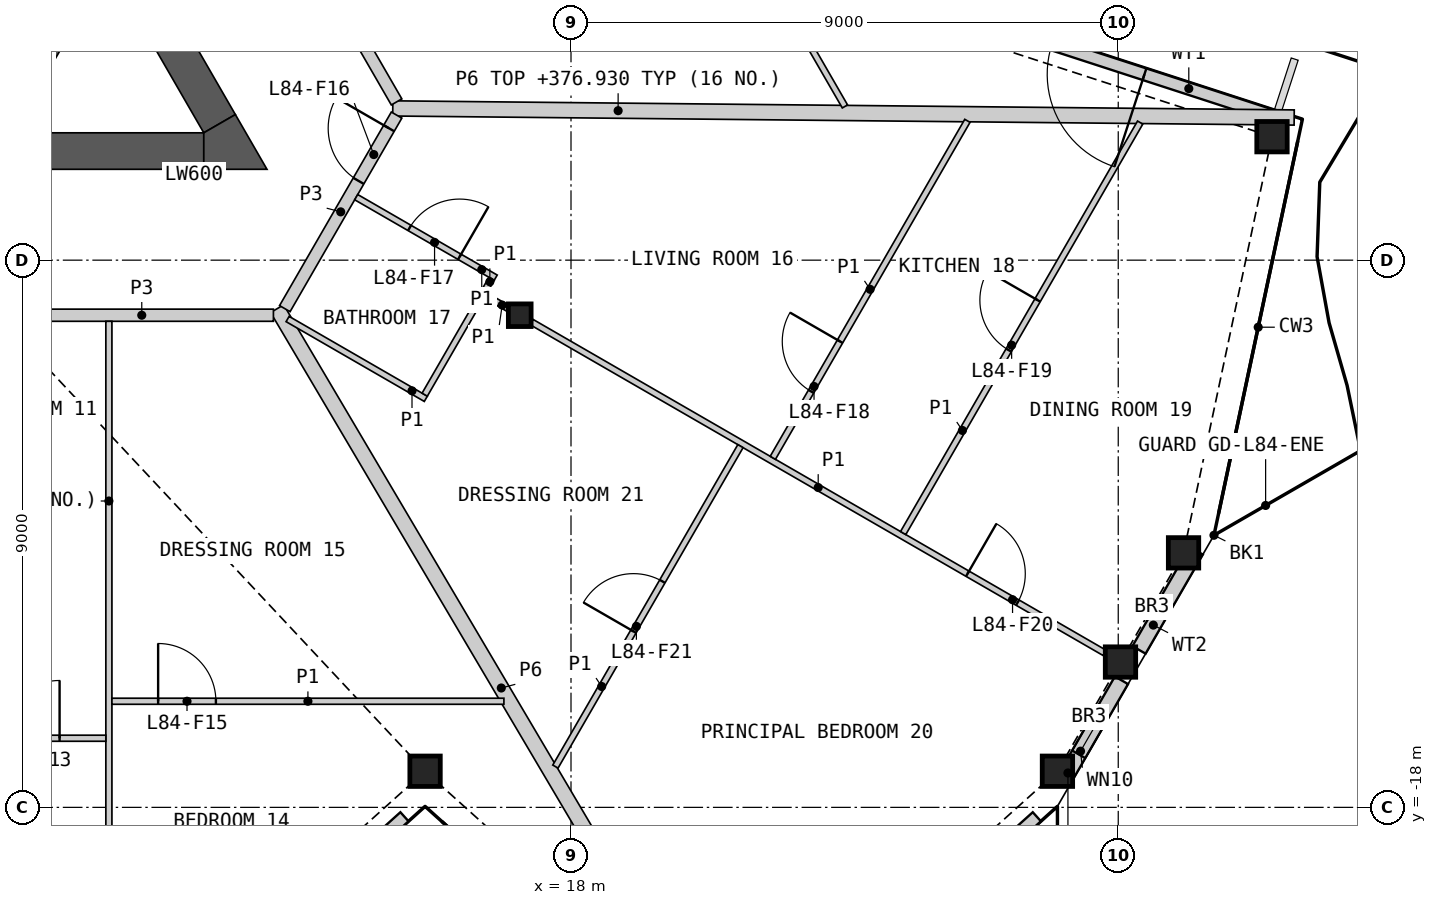
"""IFC4 building model, lengths in metres.
Left out: names, types, materials, properties, quantities, classifications, styles, units other than length and angle.
Written with IfcOpenShell. Run it as: python <this file> out.ifc"""

import sys

from ifc_helpers import new_model, si_unit, direction, frame, frame_2d, origin, origin_2d, place, context, subcontext, project, spatial, polyline, rectangle, hollow_rectangle, i_section, outline, extrude, element, fill, save


model = new_model("IFC4")
c1 = context("Model", 3, precision=1e-05, world=origin(), true_north=direction((0.0, 1.0)))
c2 = subcontext(c1, "Body", "Model", "MODEL_VIEW")
j1 = project(units=[si_unit("LENGTHUNIT", "METRE"), si_unit("PLANEANGLEUNIT", "RADIAN")], contexts=[c1])
p1 = place(None, origin())
s1 = spatial("IfcSite", under=j1, at=p1, CompositionType="ELEMENT")
p2 = place(p1, origin())
s2 = spatial("IfcBuilding", under=s1, at=p2, CompositionType="ELEMENT")
p3 = place(p2, frame((0.0, 0.0, 374.6)))
s3 = spatial("IfcBuildingStorey", under=s2, at=p3, CompositionType="ELEMENT", Elevation=374.6)
for number, where, z_axis, x_axis in (
    (1, (15.6, -17.406, 0.0), (0.0, 0.0, 1.0), (1.0, 0.0, 0.0)),
    (2, (26.0, -17.406, 0.0), (0.0, 0.0, 1.0), (1.0, 0.0, 0.0)),
    (3, (27.037, -15.61, 0.0), (0.0, 0.0, 1.0), (1.0, 0.0, 0.0)),
    (4, (28.074, -13.814, 0.0), (0.0, 0.0, 1.0), (1.0, 0.0, 0.0)),
    (5, (29.529, -6.969, 0.0), (0.0, 0.0, 1.0), (1.0, 0.0, 0.0)),
):
    element("IfcColumn", number, at=place(p3, frame(where, z_axis=z_axis, x_axis=x_axis)), inside=s3, PredefinedType="COLUMN", context=c2, shape_type="SweptSolid", body=[
        extrude(hollow_rectangle(XDim=0.5, YDim=0.5, WallThickness=0.03, at=origin_2d()), origin(), (0.0, 0.0, 1.0), 3.4),
    ])
p4 = place(p3, frame((17.157, -9.906, 0.0), z_axis=(0.0, 0.0, 1.0), x_axis=(1.0, 0.0, 0.0)))
e6 = element("IfcColumn", 6, at=p4, inside=s3, PredefinedType="COLUMN", context=c2, shape_type="SweptSolid", body=[
    extrude(i_section(OverallWidth=0.374, OverallDepth=0.372, WebThickness=0.016, FlangeThickness=0.026, at=origin_2d()), origin(), (0.0, 0.0, 1.0), 3.4),
])
p5 = place(p3, frame((10.605, -22.346, 0.0), z_axis=(0.0, 0.0, 1.0), x_axis=(0.743137181878, 0.669139095339, 0.0)))
e7 = element("IfcWall", 7, at=p5, inside=s3, PredefinedType="SOLIDWALL", context=c2, shape_type="SweptSolid", body=[
    extrude(rectangle(XDim=6.265, YDim=0.2, at=frame_2d((3.133, 0.0))), origin(), (0.0, 0.0, 1.0), 2.634),
])
p6 = place(p5, frame((2.333, 0.0, 0.0)))
e8 = element("IfcOpeningElement", 8, at=p6, cuts=e7, PredefinedType="OPENING", context=c2, shape_type="SweptSolid", body=[
    extrude(rectangle(XDim=1.6, YDim=2.25, at=frame_2d((0.8, 1.125))), frame((0.0, 0.11, 0.0), z_axis=(0.0, -1.0, 0.0), x_axis=(1.0, 0.0, 0.0)), (0.0, 0.0, 1.0), 0.22),
])
p7 = place(p3, frame((21.005, -22.346, 0.0), z_axis=(0.0, 0.0, 1.0), x_axis=(0.743137181878, 0.669139095339, 0.0)))
e9 = element("IfcWall", 9, at=p7, inside=s3, PredefinedType="SOLIDWALL", context=c2, shape_type="SweptSolid", body=[
    extrude(rectangle(XDim=6.265, YDim=0.2, at=frame_2d((3.133, 0.0))), origin(), (0.0, 0.0, 1.0), 2.634),
])
p8 = place(p7, frame((2.333, 0.0, 0.0)))
e10 = element("IfcOpeningElement", 10, at=p8, cuts=e9, PredefinedType="OPENING", context=c2, shape_type="SweptSolid", body=[
    extrude(rectangle(XDim=1.6, YDim=2.25, at=frame_2d((0.8, 1.125))), frame((0.0, 0.11, 0.0), z_axis=(0.0, -1.0, 0.0), x_axis=(1.0, 0.0, 0.0)), (0.0, 0.0, 1.0), 0.22),
])
p9 = place(p3, frame((26.075, -17.604, 0.0), z_axis=(0.0, 0.0, 1.0), x_axis=(0.500017700655, 0.866015184065, 0.0)))
e11 = element("IfcWall", 11, at=p9, inside=s3, PredefinedType="SOLIDWALL", context=c2, shape_type="SweptSolid", body=[
    extrude(rectangle(XDim=1.957, YDim=0.25, at=frame_2d((0.978, 0.0))), origin(), (0.0, 0.0, 1.0), 2.634),
])
p10 = place(p9, frame((0.55, 0.0, 0.4)))
e12 = element("IfcOpeningElement", 12, at=p10, cuts=e11, PredefinedType="OPENING", context=c2, shape_type="SweptSolid", body=[
    extrude(rectangle(XDim=0.6, YDim=0.6, at=frame_2d((0.3, 0.3))), frame((0.0, 0.135, 0.0), z_axis=(0.0, -1.0, 0.0), x_axis=(1.0, 0.0, 0.0)), (0.0, 0.0, 1.0), 0.27),
])
p11 = place(p3, frame((27.342, -15.41, 0.0), z_axis=(0.0, 0.0, 1.0), x_axis=(0.500044242988, 0.865999858577, 0.0)))
e13 = element("IfcWall", 13, at=p11, inside=s3, PredefinedType="SOLIDWALL", context=c2, shape_type="SweptSolid", body=[
    extrude(rectangle(XDim=1.883, YDim=0.25, at=frame_2d((0.941, 0.0))), origin(), (0.0, 0.0, 1.0), 2.634),
])
p12 = place(p3, frame((29.65, -6.663, 0.0), z_axis=(0.0, 0.0, 1.0), x_axis=(-0.951056402988, 0.3090173431, 0.0)))
e14 = element("IfcWall", 14, at=p12, inside=s3, PredefinedType="SOLIDWALL", context=c2, shape_type="SweptSolid", body=[
    extrude(rectangle(XDim=6.265, YDim=0.2, at=frame_2d((3.133, 0.0))), origin(), (0.0, 0.0, 1.0), 2.634),
])
p13 = place(p12, frame((2.333, 0.0, 0.0)))
e15 = element("IfcOpeningElement", 15, at=p13, cuts=e14, PredefinedType="OPENING", context=c2, shape_type="SweptSolid", body=[
    extrude(rectangle(XDim=1.6, YDim=2.25, at=frame_2d((0.8, 1.125))), frame((0.0, 0.11, 0.0), z_axis=(0.0, -1.0, 0.0), x_axis=(1.0, 0.0, 0.0)), (0.0, 0.0, 1.0), 0.22),
])
p14 = place(p3, origin())
e16 = element("IfcWall", 16, at=p14, inside=s3, PredefinedType="SHEAR", context=c2, shape_type="SweptSolid", body=[
    extrude(outline(polyline([(8.83, -6.881), (10.374, -4.206), (10.032, -4.298), (8.738, -6.539), (8.83, -6.881)])), origin(), (0.0, 0.0, 1.0), 3.1),
])
p15 = place(p3, frame((-4.892, -7.206, 0.0), z_axis=(0.0, 0.0, 1.0), x_axis=(1.0, 0.0, 0.0)))
e17 = element("IfcWall", 17, at=p15, inside=s3, PredefinedType="SHEAR", context=c2, shape_type="SweptSolid", body=[
    extrude(rectangle(XDim=16.853, YDim=0.6, at=frame_2d((8.426, 0.0))), origin(), (0.0, 0.0, 1.0), 3.1),
])
p16 = place(p3, frame((12.221, -6.756, 0.0), z_axis=(0.0, 0.0, 1.0), x_axis=(-0.50000604952, 0.866021911064, 0.0)))
e18 = element("IfcWall", 18, at=p16, inside=s3, PredefinedType="SHEAR", context=c2, shape_type="SweptSolid", body=[
    extrude(rectangle(XDim=4.869, YDim=0.6, at=frame_2d((2.434, 0.0))), origin(), (0.0, 0.0, 1.0), 3.1),
])
p17 = place(p3, origin())
e19 = element("IfcWall", 19, at=p17, inside=s3, PredefinedType="SHEAR", context=c2, shape_type="SweptSolid", body=[
    extrude(outline(polyline([(11.961, -7.506), (11.961, -6.906), (12.48, -6.606), (13.0, -7.506), (11.961, -7.506)])), origin(), (0.0, 0.0, 1.0), 3.1),
])
p18 = place(p3, frame((15.069, -6.504, 0.0), z_axis=(0.0, 0.0, 1.0), x_axis=(0.999949045807, -0.01009483976, 0.0)))
e20 = element("IfcWall", 20, at=p18, inside=s3, PredefinedType="PARTITIONING", context=c2, shape_type="SweptSolid", body=[
    extrude(rectangle(XDim=14.825, YDim=0.25, at=frame_2d((7.413, 0.0))), origin(), (0.0, 0.0, 1.0), 2.33),
])
p19 = place(p3, frame((13.167, -9.798, 0.0), z_axis=(0.0, 0.0, 1.0), x_axis=(0.508707178493, -0.860939606796, 0.0)))
e21 = element("IfcWall", 21, at=p19, inside=s3, PredefinedType="PARTITIONING", context=c2, shape_type="SweptSolid", body=[
    extrude(rectangle(XDim=14.493, YDim=0.25, at=frame_2d((7.247, 0.0))), origin(), (0.0, 0.0, 1.0), 2.33),
])
p20 = place(p3, frame((8.775, -9.906, 0.0), z_axis=(0.0, 0.0, 1.0), x_axis=(1.0, 0.0, 0.0)))
e22 = element("IfcWall", 22, at=p20, inside=s3, PredefinedType="PARTITIONING", context=c2, shape_type="SweptSolid", body=[
    extrude(rectangle(XDim=4.331, YDim=0.2, at=frame_2d((2.165, 0.0))), origin(), (0.0, 0.0, 1.0), 3.1),
])
p21 = place(p3, frame((12.981, -2.673, 0.0), z_axis=(0.0, 0.0, 1.0), x_axis=(0.499986217557, -0.866033360935, 0.0)))
e23 = element("IfcWall", 23, at=p21, inside=s3, PredefinedType="PARTITIONING", context=c2, shape_type="SweptSolid", body=[
    extrude(rectangle(XDim=4.3, YDim=0.2, at=frame_2d((2.15, 0.0))), origin(), (0.0, 0.0, 1.0), 3.1),
])
p22 = place(p3, frame((13.293, -9.797, 0.0), z_axis=(0.0, 0.0, 1.0), x_axis=(0.499967746641, 0.866044024469, 0.0)))
e24 = element("IfcWall", 24, at=p22, inside=s3, PredefinedType="PARTITIONING", context=c2, shape_type="SweptSolid", body=[
    extrude(rectangle(XDim=3.676, YDim=0.2, at=frame_2d((1.838, 0.0))), origin(), (0.0, 0.0, 1.0), 3.1),
])
p23 = place(p22, frame((2.426, 0.0, 0.0)))
e25 = element("IfcOpeningElement", 25, at=p23, cuts=e24, PredefinedType="OPENING", context=c2, shape_type="SweptSolid", body=[
    extrude(rectangle(XDim=1.0, YDim=2.1, at=frame_2d((0.5, 1.05))), frame((0.0, 0.11, 0.0), z_axis=(0.0, -1.0, 0.0), x_axis=(1.0, 0.0, 0.0)), (0.0, 0.0, 1.0), 0.22),
])
p24 = place(p3, frame((10.4, -21.828, 0.0), z_axis=(0.0, 0.0, 1.0), x_axis=(0.0, 1.0, 0.0)))
e26 = element("IfcWall", 26, at=p24, inside=s3, PredefinedType="PARTITIONING", context=c2, shape_type="SweptSolid", body=[
    extrude(rectangle(XDim=11.822, YDim=0.1, at=frame_2d((5.911, 0.0))), origin(), (0.0, 0.0, 1.0), 2.33),
])
p25 = place(p24, frame((1.156, 0.0, 0.0)))
e27 = element("IfcOpeningElement", 27, at=p25, cuts=e26, PredefinedType="OPENING", context=c2, shape_type="SweptSolid", body=[
    extrude(rectangle(XDim=0.95, YDim=2.1, at=frame_2d((0.475, 1.05))), frame((0.0, 0.06, 0.0), z_axis=(0.0, -1.0, 0.0), x_axis=(1.0, 0.0, 0.0)), (0.0, 0.0, 1.0), 0.12),
])
p26 = place(p3, frame((17.354, -10.019, 0.0), z_axis=(0.0, 0.0, 1.0), x_axis=(0.866019680922, -0.500009912158, 0.0)))
e28 = element("IfcWall", 28, at=p26, inside=s3, PredefinedType="PARTITIONING", context=c2, shape_type="SweptSolid", body=[
    extrude(rectangle(XDim=10.881, YDim=0.1, at=frame_2d((5.44, 0.0))), origin(), (0.0, 0.0, 1.0), 2.33),
])
p27 = place(p26, frame((8.276, 0.0, 0.0)))
e29 = element("IfcOpeningElement", 29, at=p27, cuts=e28, PredefinedType="OPENING", context=c2, shape_type="SweptSolid", body=[
    extrude(rectangle(XDim=0.95, YDim=2.1, at=frame_2d((0.475, 1.05))), frame((0.0, 0.06, 0.0), z_axis=(0.0, -1.0, 0.0), x_axis=(1.0, 0.0, 0.0)), (0.0, 0.0, 1.0), 0.12),
])
p28 = place(p3, frame((23.463, -13.488, 0.0), z_axis=(0.0, 0.0, 1.0), x_axis=(0.500012519194, 0.866018175704, 0.0)))
e30 = element("IfcWall", 30, at=p28, inside=s3, PredefinedType="PARTITIONING", context=c2, shape_type="SweptSolid", body=[
    extrude(rectangle(XDim=7.796, YDim=0.1, at=frame_2d((3.898, 0.0))), origin(), (0.0, 0.0, 1.0), 2.33),
])
p29 = place(p28, frame((3.473, 0.0, 0.0)))
e31 = element("IfcOpeningElement", 31, at=p29, cuts=e30, PredefinedType="OPENING", context=c2, shape_type="SweptSolid", body=[
    extrude(rectangle(XDim=0.95, YDim=2.1, at=frame_2d((0.475, 1.05))), frame((0.0, 0.06, 0.0), z_axis=(0.0, -1.0, 0.0), x_axis=(1.0, 0.0, 0.0)), (0.0, 0.0, 1.0), 0.12),
])
p30 = place(p3, frame((19.302, -0.923, 0.0), z_axis=(0.0, 0.0, 1.0), x_axis=(0.499999516514, -0.866025682925, 0.0)))
e32 = element("IfcWall", 32, at=p30, inside=s3, PredefinedType="PARTITIONING", context=c2, shape_type="SweptSolid", body=[
    extrude(rectangle(XDim=6.407, YDim=0.1, at=frame_2d((3.204, 0.0))), origin(), (0.0, 0.0, 1.0), 2.33),
])
p31 = place(p30, frame((2.476, 0.0, 0.0)))
e33 = element("IfcOpeningElement", 33, at=p31, cuts=e32, PredefinedType="OPENING", context=c2, shape_type="SweptSolid", body=[
    extrude(rectangle(XDim=0.95, YDim=2.1, at=frame_2d((0.475, 1.05))), frame((0.0, 0.06, 0.0), z_axis=(0.0, -1.0, 0.0), x_axis=(1.0, 0.0, 0.0)), (0.0, 0.0, 1.0), 0.12),
])
p32 = place(p3, frame((21.319, -12.251, 0.0), z_axis=(0.0, 0.0, 1.0), x_axis=(0.499999833739, 0.866025499775, 0.0)))
e34 = element("IfcWall", 34, at=p32, inside=s3, PredefinedType="PARTITIONING", context=c2, shape_type="SweptSolid", body=[
    extrude(rectangle(XDim=6.4, YDim=0.1, at=frame_2d((3.2, 0.0))), origin(), (0.0, 0.0, 1.0), 2.33),
])
p33 = place(p32, frame((1.26, 0.0, 0.0)))
e35 = element("IfcOpeningElement", 35, at=p33, cuts=e34, PredefinedType="OPENING", context=c2, shape_type="SweptSolid", body=[
    extrude(rectangle(XDim=0.95, YDim=2.1, at=frame_2d((0.475, 1.05))), frame((0.0, 0.06, 0.0), z_axis=(0.0, -1.0, 0.0), x_axis=(1.0, 0.0, 0.0)), (0.0, 0.0, 1.0), 0.12),
])
p34 = place(p3, frame((10.45, -16.255, 0.0), z_axis=(0.0, 0.0, 1.0), x_axis=(1.0, 0.0, 0.0)))
e36 = element("IfcWall", 36, at=p34, inside=s3, PredefinedType="PARTITIONING", context=c2, shape_type="SweptSolid", body=[
    extrude(rectangle(XDim=6.447, YDim=0.1, at=frame_2d((3.223, 0.0))), origin(), (0.0, 0.0, 1.0), 2.33),
])
p35 = place(p34, frame((0.76, 0.0, 0.0)))
e37 = element("IfcOpeningElement", 37, at=p35, cuts=e36, PredefinedType="OPENING", context=c2, shape_type="SweptSolid", body=[
    extrude(rectangle(XDim=0.95, YDim=2.1, at=frame_2d((0.475, 1.05))), frame((0.0, 0.06, 0.0), z_axis=(0.0, -1.0, 0.0), x_axis=(1.0, 0.0, 0.0)), (0.0, 0.0, 1.0), 0.12),
])
p36 = place(p3, frame((17.744, -17.329, 0.0), z_axis=(0.0, 0.0, 1.0), x_axis=(0.49997479812, 0.866039953608, 0.0)))
e38 = element("IfcWall", 38, at=p36, inside=s3, PredefinedType="PARTITIONING", context=c2, shape_type="SweptSolid", body=[
    extrude(rectangle(XDim=6.086, YDim=0.1, at=frame_2d((3.043, 0.0))), origin(), (0.0, 0.0, 1.0), 2.33),
])
p37 = place(p36, frame((2.568, 0.0, 0.0)))
e39 = element("IfcOpeningElement", 39, at=p37, cuts=e38, PredefinedType="OPENING", context=c2, shape_type="SweptSolid", body=[
    extrude(rectangle(XDim=0.95, YDim=2.1, at=frame_2d((0.475, 1.05))), frame((0.0, 0.06, 0.0), z_axis=(0.0, -1.0, 0.0), x_axis=(1.0, 0.0, 0.0)), (0.0, 0.0, 1.0), 0.12),
])
p38 = place(p3, frame((5.325, -16.863, 0.0), z_axis=(0.0, 0.0, 1.0), x_axis=(1.0, 0.0, 0.0)))
e40 = element("IfcWall", 40, at=p38, inside=s3, PredefinedType="PARTITIONING", context=c2, shape_type="SweptSolid", body=[
    extrude(rectangle(XDim=5.025, YDim=0.1, at=frame_2d((2.513, 0.0))), origin(), (0.0, 0.0, 1.0), 2.33),
])
p39 = place(p38, frame((3.314, 0.0, 0.0)))
e41 = element("IfcOpeningElement", 41, at=p39, cuts=e40, PredefinedType="OPENING", context=c2, shape_type="SweptSolid", body=[
    extrude(rectangle(XDim=0.95, YDim=2.1, at=frame_2d((0.475, 1.05))), frame((0.0, 0.06, 0.0), z_axis=(0.0, -1.0, 0.0), x_axis=(1.0, 0.0, 0.0)), (0.0, 0.0, 1.0), 0.12),
])
p40 = place(p3, frame((13.339, -9.968, 0.0), z_axis=(0.0, 0.0, 1.0), x_axis=(0.866013657776, -0.500020344131, 0.0)))
e42 = element("IfcWall", 42, at=p40, inside=s3, PredefinedType="PARTITIONING", context=c2, shape_type="SweptSolid", body=[
    extrude(rectangle(XDim=2.625, YDim=0.1, at=frame_2d((1.312, 0.0))), origin(), (0.0, 0.0, 1.0), 2.33),
])
p41 = place(p3, frame((14.467, -7.964, 0.0), z_axis=(0.0, 0.0, 1.0), x_axis=(0.866062824362, -0.499935180056, 0.0)))
e43 = element("IfcWall", 43, at=p41, inside=s3, PredefinedType="PARTITIONING", context=c2, shape_type="SweptSolid", body=[
    extrude(rectangle(XDim=2.649, YDim=0.1, at=frame_2d((1.325, 0.0))), origin(), (0.0, 0.0, 1.0), 2.33),
])
p42 = place(p41, frame((1.013, 0.0, 0.0)))
e44 = element("IfcOpeningElement", 44, at=p42, cuts=e43, PredefinedType="OPENING", context=c2, shape_type="SweptSolid", body=[
    extrude(rectangle(XDim=0.95, YDim=2.1, at=frame_2d((0.475, 1.05))), frame((0.0, 0.06, 0.0), z_axis=(0.0, -1.0, 0.0), x_axis=(1.0, 0.0, 0.0)), (0.0, 0.0, 1.0), 0.12),
])
p43 = place(p3, frame((15.594, -11.212, 0.0), z_axis=(0.0, 0.0, 1.0), x_axis=(0.499958068602, 0.866049611535, 0.0)))
e45 = element("IfcWall", 45, at=p43, inside=s3, PredefinedType="PARTITIONING", context=c2, shape_type="SweptSolid", body=[
    extrude(rectangle(XDim=1.973, YDim=0.1, at=frame_2d((0.987, 0.0))), origin(), (0.0, 0.0, 1.0), 2.33),
])
p44 = place(p3, frame((16.594, -9.581, 0.0), z_axis=(0.0, 0.0, 1.0), x_axis=(0.866137484628, -0.499805820016, 0.0)))
e46 = element("IfcWall", 46, at=p44, inside=s3, PredefinedType="PARTITIONING", context=c2, shape_type="SweptSolid", body=[
    extrude(rectangle(XDim=0.423, YDim=0.1, at=frame_2d((0.211, 0.0))), origin(), (0.0, 0.0, 1.0), 2.33),
])
p45 = place(p3, frame((16.582, -9.501, 0.0), z_axis=(0.0, 0.0, 1.0), x_axis=(0.49742780181, 0.86750537865, 0.0)))
e47 = element("IfcWall", 47, at=p45, inside=s3, PredefinedType="PARTITIONING", context=c2, shape_type="SweptSolid", body=[
    extrude(rectangle(XDim=0.224, YDim=0.1, at=frame_2d((0.112, 0.0))), origin(), (0.0, 0.0, 1.0), 2.33),
])
p46 = place(p10, origin())
e48 = element("IfcWindow", 48, at=p46, inside=s3, PartitioningType="SINGLE_PANEL", PredefinedType="WINDOW", context=c2, shape_type="SweptSolid", body=[
    extrude(rectangle(XDim=0.6, YDim=0.6, at=frame_2d((0.3, 0.3))), frame((0.0, 0.03, 0.0), z_axis=(0.0, -1.0, 0.0), x_axis=(1.0, 0.0, 0.0)), (0.0, 0.0, 1.0), 0.06),
])
fill(e12, e48)
p47 = place(p13, origin())
e49 = element("IfcDoor", 49, at=p47, inside=s3, OperationType="DOUBLE_DOOR_SINGLE_SWING", PredefinedType="DOOR", context=c2, shape_type="SweptSolid", body=[
    extrude(rectangle(XDim=1.6, YDim=2.25, at=frame_2d((0.8, 1.125))), frame((0.0, 0.025, 0.0), z_axis=(0.0, -1.0, 0.0), x_axis=(1.0, 0.0, 0.0)), (0.0, 0.0, 1.0), 0.05),
])
fill(e15, e49)
p48 = place(p39, origin())
e50 = element("IfcDoor", 50, at=p48, inside=s3, OperationType="SINGLE_SWING_RIGHT", PredefinedType="DOOR", context=c2, shape_type="SweptSolid", body=[
    extrude(rectangle(XDim=0.95, YDim=2.1, at=frame_2d((0.475, 1.05))), frame((0.0, 0.025, 0.0), z_axis=(0.0, -1.0, 0.0), x_axis=(1.0, 0.0, 0.0)), (0.0, 0.0, 1.0), 0.05),
])
fill(e41, e50)
p49 = place(p35, origin())
e51 = element("IfcDoor", 51, at=p49, inside=s3, OperationType="SINGLE_SWING_LEFT", PredefinedType="DOOR", context=c2, shape_type="SweptSolid", body=[
    extrude(rectangle(XDim=0.95, YDim=2.1, at=frame_2d((0.475, 1.05))), frame((0.0, 0.025, 0.0), z_axis=(0.0, -1.0, 0.0), x_axis=(1.0, 0.0, 0.0)), (0.0, 0.0, 1.0), 0.05),
])
fill(e37, e51)
p50 = place(p23, origin())
e52 = element("IfcDoor", 52, at=p50, inside=s3, OperationType="SINGLE_SWING_RIGHT", PredefinedType="DOOR", context=c2, shape_type="SweptSolid", body=[
    extrude(rectangle(XDim=1.0, YDim=2.1, at=frame_2d((0.5, 1.05))), frame((0.0, 0.025, 0.0), z_axis=(0.0, -1.0, 0.0), x_axis=(1.0, 0.0, 0.0)), (0.0, 0.0, 1.0), 0.05),
])
fill(e25, e52)
p51 = place(p42, origin())
e53 = element("IfcDoor", 53, at=p51, inside=s3, OperationType="SINGLE_SWING_RIGHT", PredefinedType="DOOR", context=c2, shape_type="SweptSolid", body=[
    extrude(rectangle(XDim=0.95, YDim=2.1, at=frame_2d((0.475, 1.05))), frame((0.0, 0.025, 0.0), z_axis=(0.0, -1.0, 0.0), x_axis=(1.0, 0.0, 0.0)), (0.0, 0.0, 1.0), 0.05),
])
fill(e44, e53)
p52 = place(p33, origin())
e54 = element("IfcDoor", 54, at=p52, inside=s3, OperationType="SINGLE_SWING_RIGHT", PredefinedType="DOOR", context=c2, shape_type="SweptSolid", body=[
    extrude(rectangle(XDim=0.95, YDim=2.1, at=frame_2d((0.475, 1.05))), frame((0.0, 0.025, 0.0), z_axis=(0.0, -1.0, 0.0), x_axis=(1.0, 0.0, 0.0)), (0.0, 0.0, 1.0), 0.05),
])
fill(e35, e54)
p53 = place(p29, origin())
e55 = element("IfcDoor", 55, at=p53, inside=s3, OperationType="SINGLE_SWING_RIGHT", PredefinedType="DOOR", context=c2, shape_type="SweptSolid", body=[
    extrude(rectangle(XDim=0.95, YDim=2.1, at=frame_2d((0.475, 1.05))), frame((0.0, 0.025, 0.0), z_axis=(0.0, -1.0, 0.0), x_axis=(1.0, 0.0, 0.0)), (0.0, 0.0, 1.0), 0.05),
])
fill(e31, e55)
p54 = place(p27, origin())
e56 = element("IfcDoor", 56, at=p54, inside=s3, OperationType="SINGLE_SWING_LEFT", PredefinedType="DOOR", context=c2, shape_type="SweptSolid", body=[
    extrude(rectangle(XDim=0.95, YDim=2.1, at=frame_2d((0.475, 1.05))), frame((0.0, 0.025, 0.0), z_axis=(0.0, -1.0, 0.0), x_axis=(1.0, 0.0, 0.0)), (0.0, 0.0, 1.0), 0.05),
])
fill(e29, e56)
p55 = place(p37, origin())
e57 = element("IfcDoor", 57, at=p55, inside=s3, OperationType="SINGLE_SWING_LEFT", PredefinedType="DOOR", context=c2, shape_type="SweptSolid", body=[
    extrude(rectangle(XDim=0.95, YDim=2.1, at=frame_2d((0.475, 1.05))), frame((0.0, 0.025, 0.0), z_axis=(0.0, -1.0, 0.0), x_axis=(1.0, 0.0, 0.0)), (0.0, 0.0, 1.0), 0.05),
])
fill(e39, e57)
save(model, sys.argv[1])
